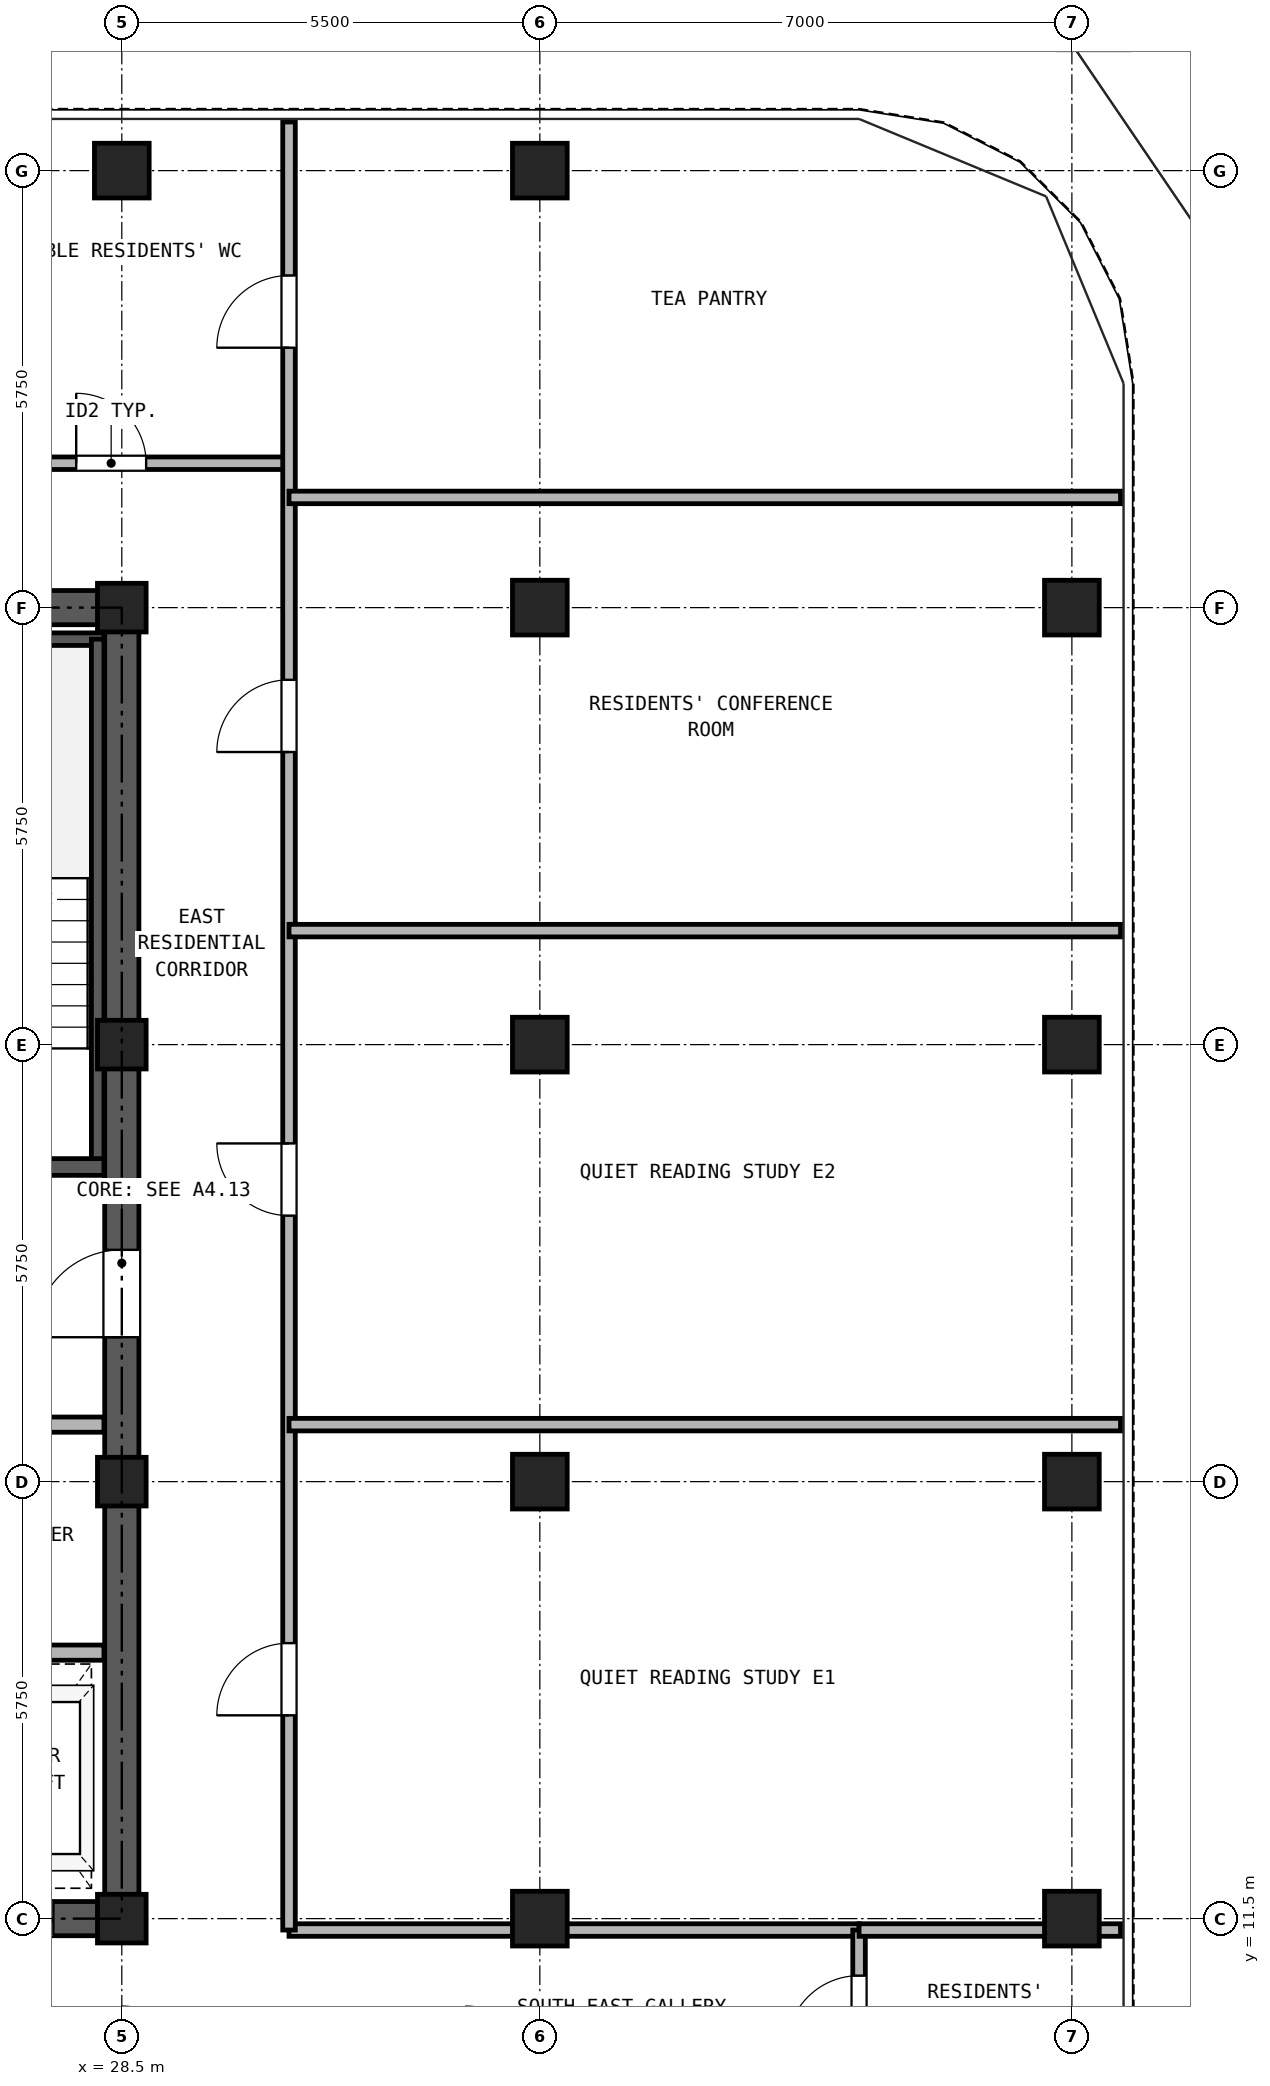
"""IFC4 building model, lengths in metres.
Left out: names, types, materials, properties, quantities, classifications, styles, units other than length and angle.
Written with IfcOpenShell. Run it as: python <this file> out.ifc"""

import sys

from ifc_helpers import new_model, si_unit, direction, frame, frame_2d, origin, origin_2d, place, context, subcontext, project, spatial, rectangle, hollow_rectangle, extrude, source, transform, mapped, element, fill, save


model = new_model("IFC4")
c1 = context("Model", 3, precision=1e-05, world=origin(), true_north=direction((0.0, 1.0)))
c2 = subcontext(c1, "Body", "Model", "MODEL_VIEW")
j1 = project(units=[si_unit("LENGTHUNIT", "METRE"), si_unit("PLANEANGLEUNIT", "RADIAN")], contexts=[c1])
p1 = place(None, origin())
s1 = spatial("IfcSite", under=j1, at=p1, CompositionType="ELEMENT")
p2 = place(p1, origin())
s2 = spatial("IfcBuilding", under=s1, at=p2, CompositionType="ELEMENT")
p3 = place(p2, frame((0.0, 0.0, 209.2)))
s3 = spatial("IfcBuildingStorey", under=s2, at=p3, CompositionType="ELEMENT", Elevation=209.2)
m1 = source(origin(), c2, "Body", "SweptSolid", [
    extrude(hollow_rectangle(XDim=0.72, YDim=0.72, WallThickness=0.04, at=origin_2d()), origin(), (0.0, 0.0, 1.0), 2.95),
])
for number, where, z_axis, x_axis in (
    (1, (28.5, 34.5, 0.0), (0.0, 0.0, 1.0), (1.0, 0.0, 0.0)),
    (2, (34.0, 34.5, 0.0), (0.0, 0.0, 1.0), (1.0, 0.0, 0.0)),
    (3, (41.0, 11.5, 0.0), (0.0, 0.0, 1.0), (1.0, 0.0, 0.0)),
    (4, (41.0, 17.25, 0.0), (0.0, 0.0, 1.0), (1.0, 0.0, 0.0)),
    (5, (41.0, 23.0, 0.0), (0.0, 0.0, 1.0), (1.0, 0.0, 0.0)),
    (6, (41.0, 28.75, 0.0), (0.0, 0.0, 1.0), (1.0, 0.0, 0.0)),
):
    element("IfcColumn", number, at=place(p3, frame(where, z_axis=z_axis, x_axis=x_axis)), inside=s3, PredefinedType="COLUMN", context=c2, shape_type="MappedRepresentation", body=[
        mapped(m1, transform((0.0, 0.0, 0.0), x_axis=(1.0, 0.0, 0.0), y_axis=(0.0, 1.0, 0.0), z_axis=(0.0, 0.0, 1.0), scale=1.0)),
    ])
m2 = source(origin(), c2, "Body", "SweptSolid", [
    extrude(hollow_rectangle(XDim=0.64, YDim=0.64, WallThickness=0.035, at=origin_2d()), origin(), (0.0, 0.0, 1.0), 2.95),
])
for number, where, z_axis, x_axis in (
    (7, (28.5, 11.5, 0.0), (0.0, 0.0, 1.0), (1.0, 0.0, 0.0)),
    (8, (28.5, 17.25, 0.0), (0.0, 0.0, 1.0), (1.0, 0.0, 0.0)),
    (9, (28.5, 23.0, 0.0), (0.0, 0.0, 1.0), (1.0, 0.0, 0.0)),
    (10, (28.5, 28.75, 0.0), (0.0, 0.0, 1.0), (1.0, 0.0, 0.0)),
):
    element("IfcColumn", number, at=place(p3, frame(where, z_axis=z_axis, x_axis=x_axis)), inside=s3, PredefinedType="COLUMN", context=c2, shape_type="MappedRepresentation", body=[
        mapped(m2, transform((0.0, 0.0, 0.0), x_axis=(1.0, 0.0, 0.0), y_axis=(0.0, 1.0, 0.0), z_axis=(0.0, 0.0, 1.0), scale=1.0)),
    ])
for number, where, z_axis, x_axis in (
    (11, (34.0, 11.5, 0.0), (0.0, 0.0, 1.0), (1.0, 0.0, 0.0)),
    (12, (34.0, 17.25, 0.0), (0.0, 0.0, 1.0), (1.0, 0.0, 0.0)),
    (13, (34.0, 23.0, 0.0), (0.0, 0.0, 1.0), (1.0, 0.0, 0.0)),
    (14, (34.0, 28.75, 0.0), (0.0, 0.0, 1.0), (1.0, 0.0, 0.0)),
):
    element("IfcColumn", number, at=place(p3, frame(where, z_axis=z_axis, x_axis=x_axis)), inside=s3, PredefinedType="COLUMN", context=c2, shape_type="MappedRepresentation", body=[
        mapped(m1, transform((0.0, 0.0, 0.0), x_axis=(1.0, 0.0, 0.0), y_axis=(0.0, 1.0, 0.0), z_axis=(0.0, 0.0, 1.0), scale=1.0)),
    ])
p4 = place(p3, frame((18.275, 11.5, 0.0), z_axis=(0.0, 0.0, 1.0), x_axis=(1.0, 0.0, 0.0)))
e15 = element("IfcWall", 15, at=p4, inside=s3, PredefinedType="SHEAR", context=c2, shape_type="SweptSolid", body=[
    extrude(rectangle(XDim=10.45, YDim=0.45, at=frame_2d((5.225, 0.0))), origin(), (0.0, 0.0, 1.0), 2.95),
])
p5 = place(p4, frame((1.825, 0.0, 0.0)))
e16 = element("IfcOpeningElement", 16, at=p5, cuts=e15, PredefinedType="OPENING", context=c2, shape_type="SweptSolid", body=[
    extrude(rectangle(XDim=0.95, YDim=2.15, at=frame_2d((0.475, 1.075))), frame((0.0, 0.235, 0.0), z_axis=(0.0, -1.0, 0.0), x_axis=(1.0, 0.0, 0.0)), (0.0, 0.0, 1.0), 0.47),
])
p6 = place(p4, frame((5.325, 0.0, 0.0)))
e17 = element("IfcOpeningElement", 17, at=p6, cuts=e15, PredefinedType="OPENING", context=c2, shape_type="SweptSolid", body=[
    extrude(rectangle(XDim=0.95, YDim=2.15, at=frame_2d((0.475, 1.075))), frame((0.0, 0.235, 0.0), z_axis=(0.0, -1.0, 0.0), x_axis=(1.0, 0.0, 0.0)), (0.0, 0.0, 1.0), 0.47),
])
p7 = place(p4, frame((8.225, 0.0, 0.0)))
e18 = element("IfcOpeningElement", 18, at=p7, cuts=e15, PredefinedType="OPENING", context=c2, shape_type="SweptSolid", body=[
    extrude(rectangle(XDim=1.1, YDim=2.25, at=frame_2d((0.55, 1.125))), frame((0.0, 0.235, 0.0), z_axis=(0.0, -1.0, 0.0), x_axis=(1.0, 0.0, 0.0)), (0.0, 0.0, 1.0), 0.47),
])
p8 = place(p3, frame((18.275, 28.75, 0.0), z_axis=(0.0, 0.0, 1.0), x_axis=(1.0, 0.0, 0.0)))
e19 = element("IfcWall", 19, at=p8, inside=s3, PredefinedType="SHEAR", context=c2, shape_type="SweptSolid", body=[
    extrude(rectangle(XDim=10.45, YDim=0.45, at=frame_2d((5.225, 0.0))), origin(), (0.0, 0.0, 1.0), 2.95),
])
p9 = place(p8, frame((4.105, 0.0, 0.0)))
e20 = element("IfcOpeningElement", 20, at=p9, cuts=e19, PredefinedType="OPENING", context=c2, shape_type="SweptSolid", body=[
    extrude(rectangle(XDim=0.9, YDim=2.05, at=frame_2d((0.45, 1.025))), frame((0.0, 0.235, 0.0), z_axis=(0.0, -1.0, 0.0), x_axis=(1.0, 0.0, 0.0)), (0.0, 0.0, 1.0), 0.47),
])
p10 = place(p8, frame((5.645, 0.0, 0.0)))
e21 = element("IfcOpeningElement", 21, at=p10, cuts=e19, PredefinedType="OPENING", context=c2, shape_type="SweptSolid", body=[
    extrude(rectangle(XDim=0.9, YDim=2.05, at=frame_2d((0.45, 1.025))), frame((0.0, 0.235, 0.0), z_axis=(0.0, -1.0, 0.0), x_axis=(1.0, 0.0, 0.0)), (0.0, 0.0, 1.0), 0.47),
])
p11 = place(p3, frame((28.5, 11.725, 0.0), z_axis=(0.0, 0.0, 1.0), x_axis=(0.0, 1.0, 0.0)))
e22 = element("IfcWall", 22, at=p11, inside=s3, PredefinedType="SHEAR", context=c2, shape_type="SweptSolid", body=[
    extrude(rectangle(XDim=16.8, YDim=0.45, at=frame_2d((8.4, 0.0))), origin(), (0.0, 0.0, 1.0), 2.95),
])
p12 = place(p11, frame((7.425, 0.0, 0.0)))
e23 = element("IfcOpeningElement", 23, at=p12, cuts=e22, PredefinedType="OPENING", context=c2, shape_type="SweptSolid", body=[
    extrude(rectangle(XDim=1.15, YDim=2.2, at=frame_2d((0.575, 1.1))), frame((0.0, 0.235, 0.0), z_axis=(0.0, -1.0, 0.0), x_axis=(1.0, 0.0, 0.0)), (0.0, 0.0, 1.0), 0.47),
])
p13 = place(p3, frame((25.13, 28.335, 0.0), z_axis=(0.0, 0.0, 1.0), x_axis=(1.0, 0.0, 0.0)))
e24 = element("IfcWall", 24, at=p13, inside=s3, PredefinedType="PARTITIONING", context=c2, shape_type="SweptSolid", body=[
    extrude(rectangle(XDim=3.135, YDim=0.165, at=frame_2d((1.567, 0.0))), origin(), (0.0, 0.0, 1.0), 2.95),
])
p14 = place(p3, frame((28.183, 21.39, 0.0), z_axis=(0.0, 0.0, 1.0), x_axis=(0.0, 1.0, 0.0)))
e25 = element("IfcWall", 25, at=p14, inside=s3, PredefinedType="PARTITIONING", context=c2, shape_type="SweptSolid", body=[
    extrude(rectangle(XDim=6.945, YDim=0.165, at=frame_2d((3.473, 0.0))), origin(), (0.0, 0.0, 1.0), 2.95),
])
p15 = place(p3, frame((25.13, 21.39, 0.0), z_axis=(0.0, 0.0, 1.0), x_axis=(1.0, 0.0, 0.0)))
e26 = element("IfcWall", 26, at=p15, inside=s3, PredefinedType="SOLIDWALL", context=c2, shape_type="SweptSolid", body=[
    extrude(rectangle(XDim=3.135, YDim=0.22, at=frame_2d((1.567, 0.0))), origin(), (0.0, 0.0, 1.0), 2.95),
])
p16 = place(p15, frame((0.92, 0.0, 0.0)))
e27 = element("IfcOpeningElement", 27, at=p16, cuts=e26, PredefinedType="OPENING", context=c2, shape_type="SweptSolid", body=[
    extrude(rectangle(XDim=1.15, YDim=2.2, at=frame_2d((0.575, 1.1))), frame((0.0, 0.12, 0.0), z_axis=(0.0, -1.0, 0.0), x_axis=(1.0, 0.0, 0.0)), (0.0, 0.0, 1.0), 0.24),
])
p17 = place(p3, frame((18.735, 18.0, 0.0), z_axis=(0.0, 0.0, 1.0), x_axis=(1.0, 0.0, 0.0)))
e28 = element("IfcWall", 28, at=p17, inside=s3, PredefinedType="PARTITIONING", context=c2, shape_type="SweptSolid", body=[
    extrude(rectangle(XDim=9.53, YDim=0.2, at=frame_2d((4.765, 0.0))), origin(), (0.0, 0.0, 1.0), 2.95),
])
p18 = place(p17, frame((0.515, 0.0, 0.0)))
e29 = element("IfcOpeningElement", 29, at=p18, cuts=e28, PredefinedType="OPENING", context=c2, shape_type="SweptSolid", body=[
    extrude(rectangle(XDim=1.3, YDim=2.3, at=frame_2d((0.65, 1.15))), frame((0.0, 0.11, 0.0), z_axis=(0.0, -1.0, 0.0), x_axis=(1.0, 0.0, 0.0)), (0.0, 0.0, 1.0), 0.22),
])
p19 = place(p17, frame((2.615, 0.0, 0.0)))
e30 = element("IfcOpeningElement", 30, at=p19, cuts=e28, PredefinedType="OPENING", context=c2, shape_type="SweptSolid", body=[
    extrude(rectangle(XDim=1.3, YDim=2.3, at=frame_2d((0.65, 1.15))), frame((0.0, 0.11, 0.0), z_axis=(0.0, -1.0, 0.0), x_axis=(1.0, 0.0, 0.0)), (0.0, 0.0, 1.0), 0.22),
])
p20 = place(p17, frame((5.015, 0.0, 0.0)))
e31 = element("IfcOpeningElement", 31, at=p20, cuts=e28, PredefinedType="OPENING", context=c2, shape_type="SweptSolid", body=[
    extrude(rectangle(XDim=0.9, YDim=2.05, at=frame_2d((0.45, 1.025))), frame((0.0, 0.11, 0.0), z_axis=(0.0, -1.0, 0.0), x_axis=(1.0, 0.0, 0.0)), (0.0, 0.0, 1.0), 0.22),
])
p21 = place(p17, frame((7.715, 0.0, 0.0)))
e32 = element("IfcOpeningElement", 32, at=p21, cuts=e28, PredefinedType="OPENING", context=c2, shape_type="SweptSolid", body=[
    extrude(rectangle(XDim=0.9, YDim=2.05, at=frame_2d((0.45, 1.025))), frame((0.0, 0.11, 0.0), z_axis=(0.0, -1.0, 0.0), x_axis=(1.0, 0.0, 0.0)), (0.0, 0.0, 1.0), 0.22),
])
p22 = place(p3, frame((18.735, 15.0, 0.0), z_axis=(0.0, 0.0, 1.0), x_axis=(1.0, 0.0, 0.0)))
e33 = element("IfcWall", 33, at=p22, inside=s3, PredefinedType="PARTITIONING", context=c2, shape_type="SweptSolid", body=[
    extrude(rectangle(XDim=9.53, YDim=0.2, at=frame_2d((4.765, 0.0))), origin(), (0.0, 0.0, 1.0), 2.95),
])
p23 = place(p3, frame((30.7, 11.35, 0.0), z_axis=(0.0, 0.0, 1.0), x_axis=(1.0, 0.0, 0.0)))
e34 = element("IfcWall", 34, at=p23, inside=s3, PredefinedType="PARTITIONING", context=c2, shape_type="SweptSolid", body=[
    extrude(rectangle(XDim=7.5, YDim=0.165, at=frame_2d((3.75, 0.0))), origin(), (0.0, 0.0, 1.0), 2.323),
])
p24 = place(p3, frame((38.2, 9.35, 0.0), z_axis=(0.0, 0.0, 1.0), x_axis=(0.0, 1.0, 0.0)))
e35 = element("IfcWall", 35, at=p24, inside=s3, PredefinedType="PARTITIONING", context=c2, shape_type="SweptSolid", body=[
    extrude(rectangle(XDim=2.0, YDim=0.165, at=frame_2d((1.0, 0.0))), origin(), (0.0, 0.0, 1.0), 2.95),
])
p25 = place(p24, frame((0.45, 0.0, 0.0)))
e36 = element("IfcOpeningElement", 36, at=p25, cuts=e35, PredefinedType="OPENING", context=c2, shape_type="SweptSolid", body=[
    extrude(rectangle(XDim=0.95, YDim=2.15, at=frame_2d((0.475, 1.075))), frame((0.0, 0.093, 0.0), z_axis=(0.0, -1.0, 0.0), x_axis=(1.0, 0.0, 0.0)), (0.0, 0.0, 1.0), 0.185),
])
p26 = place(p3, frame((16.3, 30.65, 0.0), z_axis=(0.0, 0.0, 1.0), x_axis=(1.0, 0.0, 0.0)))
e37 = element("IfcWall", 37, at=p26, inside=s3, PredefinedType="PARTITIONING", context=c2, shape_type="SweptSolid", body=[
    extrude(rectangle(XDim=14.4, YDim=0.165, at=frame_2d((7.2, 0.0))), origin(), (0.0, 0.0, 1.0), 2.95),
])
p27 = place(p26, frame((3.1, 0.0, 0.0)))
e38 = element("IfcOpeningElement", 38, at=p27, cuts=e37, PredefinedType="OPENING", context=c2, shape_type="SweptSolid", body=[
    extrude(rectangle(XDim=0.95, YDim=2.15, at=frame_2d((0.475, 1.075))), frame((0.0, 0.093, 0.0), z_axis=(0.0, -1.0, 0.0), x_axis=(1.0, 0.0, 0.0)), (0.0, 0.0, 1.0), 0.185),
])
p28 = place(p26, frame((8.0, 0.0, 0.0)))
e39 = element("IfcOpeningElement", 39, at=p28, cuts=e37, PredefinedType="OPENING", context=c2, shape_type="SweptSolid", body=[
    extrude(rectangle(XDim=0.95, YDim=2.15, at=frame_2d((0.475, 1.075))), frame((0.0, 0.093, 0.0), z_axis=(0.0, -1.0, 0.0), x_axis=(1.0, 0.0, 0.0)), (0.0, 0.0, 1.0), 0.185),
])
p29 = place(p26, frame((11.6, 0.0, 0.0)))
e40 = element("IfcOpeningElement", 40, at=p29, cuts=e37, PredefinedType="OPENING", context=c2, shape_type="SweptSolid", body=[
    extrude(rectangle(XDim=0.92, YDim=2.1, at=frame_2d((0.46, 1.05))), frame((0.0, 0.093, 0.0), z_axis=(0.0, -1.0, 0.0), x_axis=(1.0, 0.0, 0.0)), (0.0, 0.0, 1.0), 0.185),
])
p30 = place(p3, frame((30.7, 11.35, 0.0), z_axis=(0.0, 0.0, 1.0), x_axis=(0.0, 1.0, 0.0)))
e41 = element("IfcWall", 41, at=p30, inside=s3, PredefinedType="PARTITIONING", context=c2, shape_type="SweptSolid", body=[
    extrude(rectangle(XDim=23.79, YDim=0.165, at=frame_2d((11.895, 0.0))), origin(), (0.0, 0.0, 1.0), 2.95),
])
p31 = place(p30, frame((2.825, 0.0, 0.0)))
e42 = element("IfcOpeningElement", 42, at=p31, cuts=e41, PredefinedType="OPENING", context=c2, shape_type="SweptSolid", body=[
    extrude(rectangle(XDim=0.95, YDim=2.15, at=frame_2d((0.475, 1.075))), frame((0.0, 0.093, 0.0), z_axis=(0.0, -1.0, 0.0), x_axis=(1.0, 0.0, 0.0)), (0.0, 0.0, 1.0), 0.185),
])
p32 = place(p30, frame((9.4, 0.0, 0.0)))
e43 = element("IfcOpeningElement", 43, at=p32, cuts=e41, PredefinedType="OPENING", context=c2, shape_type="SweptSolid", body=[
    extrude(rectangle(XDim=0.95, YDim=2.15, at=frame_2d((0.475, 1.075))), frame((0.0, 0.093, 0.0), z_axis=(0.0, -1.0, 0.0), x_axis=(1.0, 0.0, 0.0)), (0.0, 0.0, 1.0), 0.185),
])
p33 = place(p30, frame((15.5, 0.0, 0.0)))
e44 = element("IfcOpeningElement", 44, at=p33, cuts=e41, PredefinedType="OPENING", context=c2, shape_type="SweptSolid", body=[
    extrude(rectangle(XDim=0.95, YDim=2.15, at=frame_2d((0.475, 1.075))), frame((0.0, 0.093, 0.0), z_axis=(0.0, -1.0, 0.0), x_axis=(1.0, 0.0, 0.0)), (0.0, 0.0, 1.0), 0.185),
])
p34 = place(p30, frame((20.82, 0.0, 0.0)))
e45 = element("IfcOpeningElement", 45, at=p34, cuts=e41, PredefinedType="OPENING", context=c2, shape_type="SweptSolid", body=[
    extrude(rectangle(XDim=0.95, YDim=2.15, at=frame_2d((0.475, 1.075))), frame((0.0, 0.093, 0.0), z_axis=(0.0, -1.0, 0.0), x_axis=(1.0, 0.0, 0.0)), (0.0, 0.0, 1.0), 0.185),
])
p35 = place(p3, frame((38.2, 11.35, 0.0), z_axis=(0.0, 0.0, 1.0), x_axis=(1.0, 0.0, 0.0)))
e46 = element("IfcWall", 46, at=p35, inside=s3, PredefinedType="PARTITIONING", context=c2, shape_type="SweptSolid", body=[
    extrude(rectangle(XDim=3.44, YDim=0.165, at=frame_2d((1.72, 0.0))), origin(), (0.0, 0.0, 1.0), 2.323),
])
for number, where, z_axis, x_axis in (
    (47, (30.7, 18.0, 0.0), (0.0, 0.0, 1.0), (1.0, 0.0, 0.0)),
    (48, (30.7, 24.5, 0.0), (0.0, 0.0, 1.0), (1.0, 0.0, 0.0)),
    (49, (30.7, 30.2, 0.0), (0.0, 0.0, 1.0), (1.0, 0.0, 0.0)),
):
    element("IfcWall", number, at=place(p3, frame(where, z_axis=z_axis, x_axis=x_axis)), inside=s3, PredefinedType="PARTITIONING", context=c2, shape_type="SweptSolid", body=[
        extrude(rectangle(XDim=10.94, YDim=0.165, at=frame_2d((5.47, 0.0))), origin(), (0.0, 0.0, 1.0), 2.95),
    ])
p36 = place(p12, origin())
e50 = element("IfcDoor", 50, at=p36, inside=s3, OperationType="SINGLE_SWING_LEFT", PredefinedType="DOOR", context=c2, shape_type="SweptSolid", body=[
    extrude(rectangle(XDim=1.15, YDim=2.2, at=frame_2d((0.575, 1.1))), frame((0.0, 0.025, 0.0), z_axis=(0.0, -1.0, 0.0), x_axis=(1.0, 0.0, 0.0)), (0.0, 0.0, 1.0), 0.05),
])
fill(e23, e50)
p37 = place(p7, frame((1.1, 0.0, 0.0), z_axis=(0.0, 0.0, 1.0), x_axis=(-1.0, 0.0, 0.0)))
e51 = element("IfcDoor", 51, at=p37, inside=s3, OperationType="DOUBLE_DOOR_SLIDING", PredefinedType="DOOR", context=c2, shape_type="SweptSolid", body=[
    extrude(rectangle(XDim=1.1, YDim=2.25, at=frame_2d((0.55, 1.125))), frame((0.0, 0.025, 0.0), z_axis=(0.0, -1.0, 0.0), x_axis=(1.0, 0.0, 0.0)), (0.0, 0.0, 1.0), 0.05),
])
fill(e18, e51)
p38 = place(p25, origin())
e52 = element("IfcDoor", 52, at=p38, inside=s3, OperationType="SINGLE_SWING_LEFT", PredefinedType="DOOR", context=c2, shape_type="SweptSolid", body=[
    extrude(rectangle(XDim=0.95, YDim=2.15, at=frame_2d((0.475, 1.075))), frame((0.0, 0.025, 0.0), z_axis=(0.0, -1.0, 0.0), x_axis=(1.0, 0.0, 0.0)), (0.0, 0.0, 1.0), 0.05),
])
fill(e36, e52)
p39 = place(p31, origin())
e53 = element("IfcDoor", 53, at=p39, inside=s3, OperationType="SINGLE_SWING_LEFT", PredefinedType="DOOR", context=c2, shape_type="SweptSolid", body=[
    extrude(rectangle(XDim=0.95, YDim=2.15, at=frame_2d((0.475, 1.075))), frame((0.0, 0.025, 0.0), z_axis=(0.0, -1.0, 0.0), x_axis=(1.0, 0.0, 0.0)), (0.0, 0.0, 1.0), 0.05),
])
fill(e42, e53)
p40 = place(p32, origin())
e54 = element("IfcDoor", 54, at=p40, inside=s3, OperationType="SINGLE_SWING_RIGHT", PredefinedType="DOOR", context=c2, shape_type="SweptSolid", body=[
    extrude(rectangle(XDim=0.95, YDim=2.15, at=frame_2d((0.475, 1.075))), frame((0.0, 0.025, 0.0), z_axis=(0.0, -1.0, 0.0), x_axis=(1.0, 0.0, 0.0)), (0.0, 0.0, 1.0), 0.05),
])
fill(e43, e54)
p41 = place(p33, origin())
e55 = element("IfcDoor", 55, at=p41, inside=s3, OperationType="SINGLE_SWING_LEFT", PredefinedType="DOOR", context=c2, shape_type="SweptSolid", body=[
    extrude(rectangle(XDim=0.95, YDim=2.15, at=frame_2d((0.475, 1.075))), frame((0.0, 0.025, 0.0), z_axis=(0.0, -1.0, 0.0), x_axis=(1.0, 0.0, 0.0)), (0.0, 0.0, 1.0), 0.05),
])
fill(e44, e55)
p42 = place(p34, origin())
e56 = element("IfcDoor", 56, at=p42, inside=s3, OperationType="SINGLE_SWING_LEFT", PredefinedType="DOOR", context=c2, shape_type="SweptSolid", body=[
    extrude(rectangle(XDim=0.95, YDim=2.15, at=frame_2d((0.475, 1.075))), frame((0.0, 0.025, 0.0), z_axis=(0.0, -1.0, 0.0), x_axis=(1.0, 0.0, 0.0)), (0.0, 0.0, 1.0), 0.05),
])
fill(e45, e56)
p43 = place(p29, origin())
e57 = element("IfcDoor", 57, at=p43, inside=s3, OperationType="SINGLE_SWING_LEFT", PredefinedType="DOOR", context=c2, shape_type="SweptSolid", body=[
    extrude(rectangle(XDim=0.92, YDim=2.1, at=frame_2d((0.46, 1.05))), frame((0.0, 0.025, 0.0), z_axis=(0.0, -1.0, 0.0), x_axis=(1.0, 0.0, 0.0)), (0.0, 0.0, 1.0), 0.05),
])
fill(e40, e57)
save(model, sys.argv[1])
